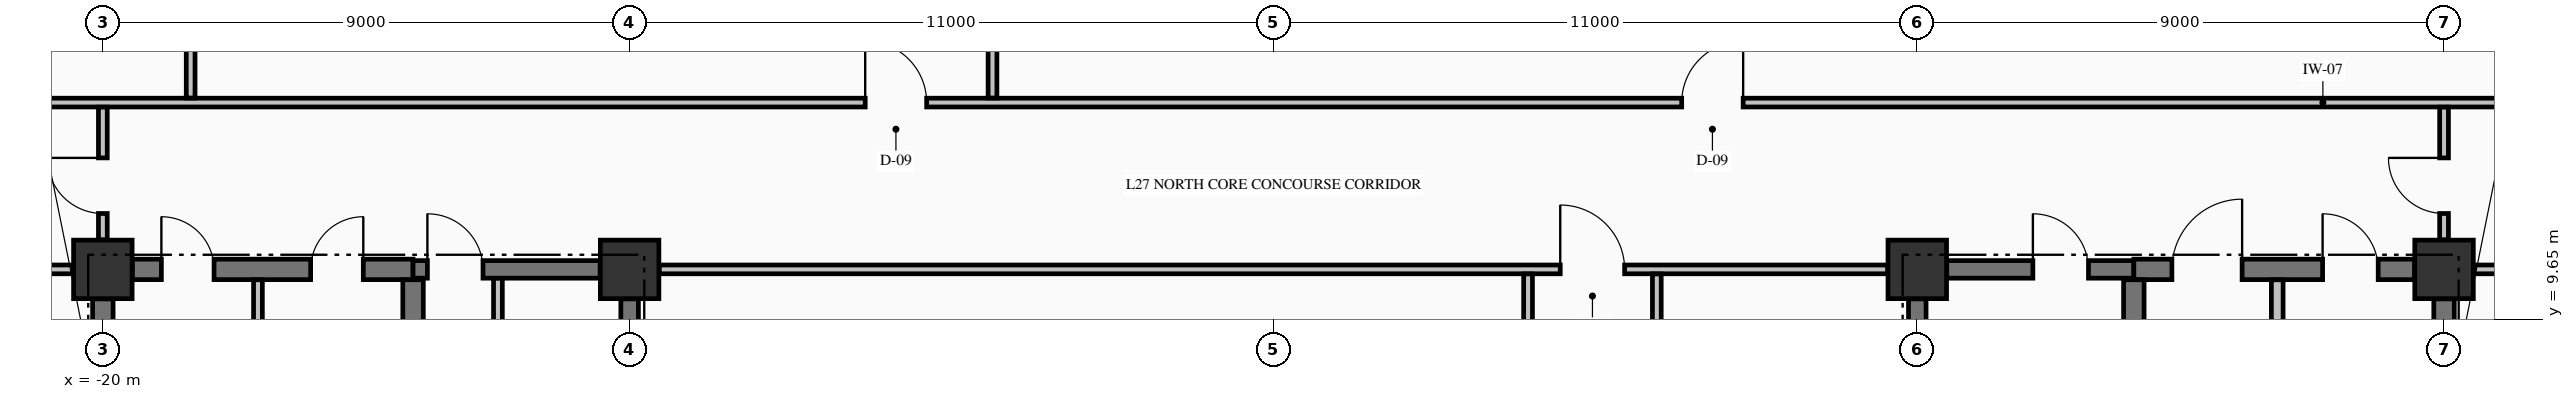
"""IFC4 building model, lengths in metres.
Left out: names, types, materials, properties, quantities, classifications, styles, units other than length and angle.
Written with IfcOpenShell. Run it as: python <this file> out.ifc"""

import sys

from ifc_helpers import new_model, si_unit, direction, frame, frame_2d, origin, origin_2d, place, context, subcontext, project, spatial, rectangle, extrude, element, fill, save


model = new_model("IFC4")
c1 = context("Model", 3, precision=1e-05, world=origin(), true_north=direction((0.0, 1.0)))
c2 = subcontext(c1, "Body", "Model", "MODEL_VIEW")
j1 = project(units=[si_unit("LENGTHUNIT", "METRE"), si_unit("PLANEANGLEUNIT", "RADIAN")], contexts=[c1])
p1 = place(None, origin())
s1 = spatial("IfcSite", under=j1, at=p1, CompositionType="ELEMENT")
p2 = place(p1, origin())
s2 = spatial("IfcBuilding", under=s1, at=p2, CompositionType="ELEMENT")
p3 = place(p2, frame((0.0, 0.0, 109.21)))
s3 = spatial("IfcBuildingStorey", under=s2, at=p3, CompositionType="ELEMENT", Elevation=109.21)
for number, where, z_axis, x_axis in (
    (1, (-20.0, 10.5, -0.25), (0.0, 0.0, 1.0), (1.0, 0.0, 0.0)),
    (2, (-11.0, 10.5, -0.25), (0.0, 0.0, 1.0), (1.0, 0.0, 0.0)),
    (3, (11.0, 10.5, -0.25), (0.0, 0.0, 1.0), (1.0, 0.0, 0.0)),
    (4, (20.0, 10.5, -0.25), (0.0, 0.0, 1.0), (1.0, 0.0, 0.0)),
):
    element("IfcColumn", number, at=place(p3, frame(where, z_axis=z_axis, x_axis=x_axis)), inside=s3, PredefinedType="COLUMN", context=c2, shape_type="SweptSolid", body=[
        extrude(rectangle(XDim=1.0, YDim=1.0, at=origin_2d()), origin(), (0.0, 0.0, 1.0), 3.57),
    ])
p4 = place(p3, frame((-19.496, 10.5, 0.0), z_axis=(0.0, 0.0, 1.0), x_axis=(1.0, 0.0, 0.0)))
e5 = element("IfcWall", 5, at=p4, inside=s3, PredefinedType="SHEAR", context=c2, shape_type="SweptSolid", body=[
    extrude(rectangle(XDim=4.796, YDim=0.35, at=frame_2d((2.398, 0.0))), origin(), (0.0, 0.0, 1.0), 3.32),
])
p5 = place(p4, frame((0.496, 0.0, 0.0)))
e6 = element("IfcOpeningElement", 6, at=p5, cuts=e5, PredefinedType="OPENING", context=c2, shape_type="SweptSolid", body=[
    extrude(rectangle(XDim=0.9, YDim=2.15, at=frame_2d((0.45, 1.075))), frame((0.0, 0.185, 0.0), z_axis=(0.0, -1.0, 0.0), x_axis=(1.0, 0.0, 0.0)), (0.0, 0.0, 1.0), 0.37),
])
p6 = place(p4, frame((3.046, 0.0, 0.0)))
e7 = element("IfcOpeningElement", 7, at=p6, cuts=e5, PredefinedType="OPENING", context=c2, shape_type="SweptSolid", body=[
    extrude(rectangle(XDim=0.9, YDim=2.15, at=frame_2d((0.45, 1.075))), frame((0.0, 0.185, 0.0), z_axis=(0.0, -1.0, 0.0), x_axis=(1.0, 0.0, 0.0)), (0.0, 0.0, 1.0), 0.37),
])
p7 = place(p3, frame((-14.7, 10.5, 0.0), z_axis=(0.0, 0.0, 1.0), x_axis=(1.0, 0.0, 0.0)))
e8 = element("IfcWall", 8, at=p7, inside=s3, PredefinedType="SHEAR", context=c2, shape_type="SweptSolid", body=[
    extrude(rectangle(XDim=3.196, YDim=0.3, at=frame_2d((1.598, 0.0))), origin(), (0.0, 0.0, 1.0), 3.32),
])
p8 = place(p7, frame((0.245, 0.0, 0.0)))
e9 = element("IfcOpeningElement", 9, at=p8, cuts=e8, PredefinedType="OPENING", context=c2, shape_type="SweptSolid", body=[
    extrude(rectangle(XDim=0.95, YDim=2.15, at=frame_2d((0.475, 1.075))), frame((0.0, 0.16, 0.0), z_axis=(0.0, -1.0, 0.0), x_axis=(1.0, 0.0, 0.0)), (0.0, 0.0, 1.0), 0.32),
])
p9 = place(p3, frame((11.504, 10.5, 0.0), z_axis=(0.0, 0.0, 1.0), x_axis=(1.0, 0.0, 0.0)))
e10 = element("IfcWall", 10, at=p9, inside=s3, PredefinedType="SHEAR", context=c2, shape_type="SweptSolid", body=[
    extrude(rectangle(XDim=3.196, YDim=0.3, at=frame_2d((1.598, 0.0))), origin(), (0.0, 0.0, 1.0), 3.32),
])
p10 = place(p9, frame((1.471, 0.0, 0.0)))
e11 = element("IfcOpeningElement", 11, at=p10, cuts=e10, PredefinedType="OPENING", context=c2, shape_type="SweptSolid", body=[
    extrude(rectangle(XDim=0.95, YDim=2.15, at=frame_2d((0.475, 1.075))), frame((0.0, 0.16, 0.0), z_axis=(0.0, -1.0, 0.0), x_axis=(1.0, 0.0, 0.0)), (0.0, 0.0, 1.0), 0.32),
])
p11 = place(p3, frame((14.7, 10.5, 0.0), z_axis=(0.0, 0.0, 1.0), x_axis=(1.0, 0.0, 0.0)))
e12 = element("IfcWall", 12, at=p11, inside=s3, PredefinedType="SHEAR", context=c2, shape_type="SweptSolid", body=[
    extrude(rectangle(XDim=4.796, YDim=0.35, at=frame_2d((2.398, 0.0))), origin(), (0.0, 0.0, 1.0), 3.32),
])
p12 = place(p11, frame((0.65, 0.0, 0.0)))
e13 = element("IfcOpeningElement", 13, at=p12, cuts=e12, PredefinedType="OPENING", context=c2, shape_type="SweptSolid", body=[
    extrude(rectangle(XDim=1.2, YDim=2.15, at=frame_2d((0.6, 1.075))), frame((0.0, 0.185, 0.0), z_axis=(0.0, -1.0, 0.0), x_axis=(1.0, 0.0, 0.0)), (0.0, 0.0, 1.0), 0.37),
])
p13 = place(p11, frame((3.225, 0.0, 0.0)))
e14 = element("IfcOpeningElement", 14, at=p13, cuts=e12, PredefinedType="OPENING", context=c2, shape_type="SweptSolid", body=[
    extrude(rectangle(XDim=0.95, YDim=2.15, at=frame_2d((0.475, 1.075))), frame((0.0, 0.185, 0.0), z_axis=(0.0, -1.0, 0.0), x_axis=(1.0, 0.0, 0.0)), (0.0, 0.0, 1.0), 0.37),
])
p14 = place(p3, frame((-22.835, 10.5, 0.0), z_axis=(0.0, 0.0, 1.0), x_axis=(1.0, 0.0, 0.0)))
e15 = element("IfcWall", 15, at=p14, inside=s3, PredefinedType="PARTITIONING", context=c2, shape_type="SweptSolid", body=[
    extrude(rectangle(XDim=2.329, YDim=0.15, at=frame_2d((1.165, 0.0))), origin(), (0.0, 0.0, 1.0), 3.32),
])
p15 = place(p14, frame((0.835, 0.0, 0.0)))
e16 = element("IfcOpeningElement", 16, at=p15, cuts=e15, PredefinedType="OPENING", context=c2, shape_type="SweptSolid", body=[
    extrude(rectangle(XDim=1.0, YDim=2.15, at=frame_2d((0.5, 1.075))), frame((0.0, 0.085, 0.0), z_axis=(0.0, -1.0, 0.0), x_axis=(1.0, 0.0, 0.0)), (0.0, 0.0, 1.0), 0.17),
])
p16 = place(p3, frame((-10.494, 10.5, 0.0), z_axis=(0.0, 0.0, 1.0), x_axis=(1.0, 0.0, 0.0)))
e17 = element("IfcWall", 17, at=p16, inside=s3, PredefinedType="PARTITIONING", context=c2, shape_type="SweptSolid", body=[
    extrude(rectangle(XDim=20.988, YDim=0.15, at=frame_2d((10.494, 0.0))), origin(), (0.0, 0.0, 1.0), 3.32),
])
p17 = place(p16, frame((15.394, 0.0, 0.0)))
e18 = element("IfcOpeningElement", 18, at=p17, cuts=e17, PredefinedType="OPENING", context=c2, shape_type="SweptSolid", body=[
    extrude(rectangle(XDim=1.1, YDim=2.15, at=frame_2d((0.55, 1.075))), frame((0.0, 0.085, 0.0), z_axis=(0.0, -1.0, 0.0), x_axis=(1.0, 0.0, 0.0)), (0.0, 0.0, 1.0), 0.17),
])
p18 = place(p3, frame((20.506, 10.5, 0.0), z_axis=(0.0, 0.0, 1.0), x_axis=(1.0, 0.0, 0.0)))
e19 = element("IfcWall", 19, at=p18, inside=s3, PredefinedType="PARTITIONING", context=c2, shape_type="SweptSolid", body=[
    extrude(rectangle(XDim=7.329, YDim=0.15, at=frame_2d((3.665, 0.0))), origin(), (0.0, 0.0, 1.0), 3.32),
])
p19 = place(p18, frame((3.019, 0.0, 0.0)))
e20 = element("IfcOpeningElement", 20, at=p19, cuts=e19, PredefinedType="OPENING", context=c2, shape_type="SweptSolid", body=[
    extrude(rectangle(XDim=0.95, YDim=2.15, at=frame_2d((0.475, 1.075))), frame((0.0, 0.085, 0.0), z_axis=(0.0, -1.0, 0.0), x_axis=(1.0, 0.0, 0.0)), (0.0, 0.0, 1.0), 0.17),
])
p20 = place(p3, frame((-22.835, 13.35, 0.0), z_axis=(0.0, 0.0, 1.0), x_axis=(1.0, 0.0, 0.0)))
e21 = element("IfcWall", 21, at=p20, inside=s3, PredefinedType="PARTITIONING", context=c2, shape_type="SweptSolid", body=[
    extrude(rectangle(XDim=50.67, YDim=0.15, at=frame_2d((25.335, 0.0))), origin(), (0.0, 0.0, 1.0), 3.32),
])
p21 = place(p20, frame((15.86, 0.0, 0.0)))
e22 = element("IfcOpeningElement", 22, at=p21, cuts=e21, PredefinedType="OPENING", context=c2, shape_type="SweptSolid", body=[
    extrude(rectangle(XDim=1.05, YDim=2.15, at=frame_2d((0.525, 1.075))), frame((0.0, 0.085, 0.0), z_axis=(0.0, -1.0, 0.0), x_axis=(1.0, 0.0, 0.0)), (0.0, 0.0, 1.0), 0.17),
])
p22 = place(p20, frame((29.81, 0.0, 0.0)))
e23 = element("IfcOpeningElement", 23, at=p22, cuts=e21, PredefinedType="OPENING", context=c2, shape_type="SweptSolid", body=[
    extrude(rectangle(XDim=1.05, YDim=2.15, at=frame_2d((0.525, 1.075))), frame((0.0, 0.085, 0.0), z_axis=(0.0, -1.0, 0.0), x_axis=(1.0, 0.0, 0.0)), (0.0, 0.0, 1.0), 0.17),
])
p23 = place(p3, frame((-20.0, 0.504, 0.0), z_axis=(0.0, 0.0, 1.0), x_axis=(0.0, 1.0, 0.0)))
e24 = element("IfcWall", 24, at=p23, inside=s3, PredefinedType="SHEAR", context=c2, shape_type="SweptSolid", body=[
    extrude(rectangle(XDim=9.492, YDim=0.35, at=frame_2d((4.746, 0.0))), origin(), (0.0, 0.0, 1.0), 3.32),
])
p24 = place(p3, frame((-14.7, 5.852, 0.0), z_axis=(0.0, 0.0, 1.0), x_axis=(0.0, 1.0, 0.0)))
e25 = element("IfcWall", 25, at=p24, inside=s3, PredefinedType="SHEAR", context=c2, shape_type="SweptSolid", body=[
    extrude(rectangle(XDim=4.471, YDim=0.35, at=frame_2d((2.235, 0.0))), origin(), (0.0, 0.0, 1.0), 3.32),
])
for number, where, z_axis, x_axis in (
    (26, (-11.0, 5.852, 0.0), (0.0, 0.0, 1.0), (0.0, 1.0, 0.0)),
    (27, (11.0, 5.852, 0.0), (0.0, 0.0, 1.0), (0.0, 1.0, 0.0)),
):
    element("IfcWall", number, at=place(p3, frame(where, z_axis=z_axis, x_axis=x_axis)), inside=s3, PredefinedType="SHEAR", context=c2, shape_type="SweptSolid", body=[
        extrude(rectangle(XDim=4.144, YDim=0.3, at=frame_2d((2.072, 0.0))), origin(), (0.0, 0.0, 1.0), 3.32),
    ])
p25 = place(p3, frame((14.7, 5.852, 0.0), z_axis=(0.0, 0.0, 1.0), x_axis=(0.0, 1.0, 0.0)))
e28 = element("IfcWall", 28, at=p25, inside=s3, PredefinedType="SHEAR", context=c2, shape_type="SweptSolid", body=[
    extrude(rectangle(XDim=4.471, YDim=0.35, at=frame_2d((2.235, 0.0))), origin(), (0.0, 0.0, 1.0), 3.32),
])
p26 = place(p3, frame((20.0, 5.377, 0.0), z_axis=(0.0, 0.0, 1.0), x_axis=(0.0, 1.0, 0.0)))
e29 = element("IfcWall", 29, at=p26, inside=s3, PredefinedType="SHEAR", context=c2, shape_type="SweptSolid", body=[
    extrude(rectangle(XDim=4.619, YDim=0.35, at=frame_2d((2.31, 0.0))), origin(), (0.0, 0.0, 1.0), 3.32),
])
p27 = place(p3, frame((-20.0, 11.006, 0.0), z_axis=(0.0, 0.0, 1.0), x_axis=(0.0, 1.0, 0.0)))
e30 = element("IfcWall", 30, at=p27, inside=s3, PredefinedType="PARTITIONING", context=c2, shape_type="SweptSolid", body=[
    extrude(rectangle(XDim=2.266, YDim=0.15, at=frame_2d((1.133, 0.0))), origin(), (0.0, 0.0, 1.0), 2.81),
])
p28 = place(p27, frame((0.449, 0.0, 0.0)))
e31 = element("IfcOpeningElement", 31, at=p28, cuts=e30, PredefinedType="OPENING", context=c2, shape_type="SweptSolid", body=[
    extrude(rectangle(XDim=0.95, YDim=2.15, at=frame_2d((0.475, 1.075))), frame((0.0, 0.085, 0.0), z_axis=(0.0, -1.0, 0.0), x_axis=(1.0, 0.0, 0.0)), (0.0, 0.0, 1.0), 0.17),
])
p29 = place(p3, frame((-18.5, 13.428, 0.0), z_axis=(0.0, 0.0, 1.0), x_axis=(0.0, 1.0, 0.0)))
e32 = element("IfcWall", 32, at=p29, inside=s3, PredefinedType="PARTITIONING", context=c2, shape_type="SweptSolid", body=[
    extrude(rectangle(XDim=6.966, YDim=0.15, at=frame_2d((3.483, 0.0))), origin(), (0.0, 0.0, 1.0), 3.32),
])
p30 = place(p3, frame((-17.35, -0.097, 0.0), z_axis=(0.0, 0.0, 1.0), x_axis=(0.0, 1.0, 0.0)))
e33 = element("IfcWall", 33, at=p30, inside=s3, PredefinedType="PARTITIONING", context=c2, shape_type="SweptSolid", body=[
    extrude(rectangle(XDim=10.419, YDim=0.15, at=frame_2d((5.209, 0.0))), origin(), (0.0, 0.0, 1.0), 3.32),
])
p31 = place(p3, frame((-13.25, 5.853, 0.0), z_axis=(0.0, 0.0, 1.0), x_axis=(0.0, 1.0, 0.0)))
e34 = element("IfcWall", 34, at=p31, inside=s3, PredefinedType="PARTITIONING", context=c2, shape_type="SweptSolid", body=[
    extrude(rectangle(XDim=4.494, YDim=0.15, at=frame_2d((2.247, 0.0))), origin(), (0.0, 0.0, 1.0), 3.32),
])
p32 = place(p31, frame((1.472, 0.0, 0.0)))
e35 = element("IfcOpeningElement", 35, at=p32, cuts=e34, PredefinedType="OPENING", context=c2, shape_type="SweptSolid", body=[
    extrude(rectangle(XDim=0.95, YDim=2.15, at=frame_2d((0.475, 1.075))), frame((0.0, 0.085, 0.0), z_axis=(0.0, -1.0, 0.0), x_axis=(1.0, 0.0, 0.0)), (0.0, 0.0, 1.0), 0.17),
])
p33 = place(p3, frame((-4.8, 13.428, 0.0), z_axis=(0.0, 0.0, 1.0), x_axis=(0.0, 1.0, 0.0)))
e36 = element("IfcWall", 36, at=p33, inside=s3, PredefinedType="PARTITIONING", context=c2, shape_type="SweptSolid", body=[
    extrude(rectangle(XDim=11.907, YDim=0.15, at=frame_2d((5.954, 0.0))), origin(), (0.0, 0.0, 1.0), 3.32),
])
for number, where, z_axis, x_axis in (
    (37, (4.35, 2.978, 0.0), (0.0, 0.0, 1.0), (0.0, 1.0, 0.0)),
    (38, (6.55, 2.978, 0.0), (0.0, 0.0, 1.0), (0.0, 1.0, 0.0)),
):
    element("IfcWall", number, at=place(p3, frame(where, z_axis=z_axis, x_axis=x_axis)), inside=s3, PredefinedType="PARTITIONING", context=c2, shape_type="SweptSolid", body=[
        extrude(rectangle(XDim=7.444, YDim=0.15, at=frame_2d((3.722, 0.0))), origin(), (0.0, 0.0, 1.0), 3.32),
    ])
p34 = place(p3, frame((17.15, 7.928, 0.0), z_axis=(0.0, 0.0, 1.0), x_axis=(0.0, 1.0, 0.0)))
e39 = element("IfcWall", 39, at=p34, inside=s3, PredefinedType="PARTITIONING", context=c2, shape_type="SweptSolid", body=[
    extrude(rectangle(XDim=2.394, YDim=0.2, at=frame_2d((1.197, 0.0))), origin(), (0.0, 0.0, 1.0), 3.32),
])
p35 = place(p3, frame((20.0, 11.006, 0.0), z_axis=(0.0, 0.0, 1.0), x_axis=(0.0, 1.0, 0.0)))
e40 = element("IfcWall", 40, at=p35, inside=s3, PredefinedType="PARTITIONING", context=c2, shape_type="SweptSolid", body=[
    extrude(rectangle(XDim=2.266, YDim=0.15, at=frame_2d((1.133, 0.0))), origin(), (0.0, 0.0, 1.0), 2.81),
])
p36 = place(p35, frame((0.449, 0.0, 0.0)))
e41 = element("IfcOpeningElement", 41, at=p36, cuts=e40, PredefinedType="OPENING", context=c2, shape_type="SweptSolid", body=[
    extrude(rectangle(XDim=0.95, YDim=2.15, at=frame_2d((0.475, 1.075))), frame((0.0, 0.085, 0.0), z_axis=(0.0, -1.0, 0.0), x_axis=(1.0, 0.0, 0.0)), (0.0, 0.0, 1.0), 0.17),
])
p37 = place(p8, origin())
e42 = element("IfcDoor", 42, at=p37, inside=s3, OperationType="SINGLE_SWING_LEFT", PredefinedType="DOOR", context=c2, shape_type="SweptSolid", body=[
    extrude(rectangle(XDim=0.95, YDim=2.15, at=frame_2d((0.475, 1.075))), frame((0.0, 0.025, 0.0), z_axis=(0.0, -1.0, 0.0), x_axis=(1.0, 0.0, 0.0)), (0.0, 0.0, 1.0), 0.05),
])
fill(e9, e42)
p38 = place(p10, origin())
e43 = element("IfcDoor", 43, at=p38, inside=s3, OperationType="SINGLE_SWING_LEFT", PredefinedType="DOOR", context=c2, shape_type="SweptSolid", body=[
    extrude(rectangle(XDim=0.95, YDim=2.15, at=frame_2d((0.475, 1.075))), frame((0.0, 0.025, 0.0), z_axis=(0.0, -1.0, 0.0), x_axis=(1.0, 0.0, 0.0)), (0.0, 0.0, 1.0), 0.05),
])
fill(e11, e43)
p39 = place(p5, origin())
e44 = element("IfcDoor", 44, at=p39, inside=s3, OperationType="SINGLE_SWING_LEFT", PredefinedType="DOOR", context=c2, shape_type="SweptSolid", body=[
    extrude(rectangle(XDim=0.9, YDim=2.15, at=frame_2d((0.45, 1.075))), frame((0.0, 0.025, 0.0), z_axis=(0.0, -1.0, 0.0), x_axis=(1.0, 0.0, 0.0)), (0.0, 0.0, 1.0), 0.05),
])
fill(e6, e44)
p40 = place(p6, origin())
e45 = element("IfcDoor", 45, at=p40, inside=s3, OperationType="SINGLE_SWING_RIGHT", PredefinedType="DOOR", context=c2, shape_type="SweptSolid", body=[
    extrude(rectangle(XDim=0.9, YDim=2.15, at=frame_2d((0.45, 1.075))), frame((0.0, 0.025, 0.0), z_axis=(0.0, -1.0, 0.0), x_axis=(1.0, 0.0, 0.0)), (0.0, 0.0, 1.0), 0.05),
])
fill(e7, e45)
p41 = place(p12, origin())
e46 = element("IfcDoor", 46, at=p41, inside=s3, OperationType="SINGLE_SWING_RIGHT", PredefinedType="DOOR", context=c2, shape_type="SweptSolid", body=[
    extrude(rectangle(XDim=1.2, YDim=2.15, at=frame_2d((0.6, 1.075))), frame((0.0, 0.025, 0.0), z_axis=(0.0, -1.0, 0.0), x_axis=(1.0, 0.0, 0.0)), (0.0, 0.0, 1.0), 0.05),
])
fill(e13, e46)
p42 = place(p13, origin())
e47 = element("IfcDoor", 47, at=p42, inside=s3, OperationType="SINGLE_SWING_LEFT", PredefinedType="DOOR", context=c2, shape_type="SweptSolid", body=[
    extrude(rectangle(XDim=0.95, YDim=2.15, at=frame_2d((0.475, 1.075))), frame((0.0, 0.025, 0.0), z_axis=(0.0, -1.0, 0.0), x_axis=(1.0, 0.0, 0.0)), (0.0, 0.0, 1.0), 0.05),
])
fill(e14, e47)
p43 = place(p17, origin())
e48 = element("IfcDoor", 48, at=p43, inside=s3, OperationType="SINGLE_SWING_LEFT", PredefinedType="DOOR", context=c2, shape_type="SweptSolid", body=[
    extrude(rectangle(XDim=1.1, YDim=2.15, at=frame_2d((0.55, 1.075))), frame((0.0, 0.025, 0.0), z_axis=(0.0, -1.0, 0.0), x_axis=(1.0, 0.0, 0.0)), (0.0, 0.0, 1.0), 0.05),
])
fill(e18, e48)
p44 = place(p21, origin())
e49 = element("IfcDoor", 49, at=p44, inside=s3, OperationType="SINGLE_SWING_LEFT", PredefinedType="DOOR", context=c2, shape_type="SweptSolid", body=[
    extrude(rectangle(XDim=1.05, YDim=2.15, at=frame_2d((0.525, 1.075))), frame((0.0, 0.025, 0.0), z_axis=(0.0, -1.0, 0.0), x_axis=(1.0, 0.0, 0.0)), (0.0, 0.0, 1.0), 0.05),
])
fill(e22, e49)
p45 = place(p22, origin())
e50 = element("IfcDoor", 50, at=p45, inside=s3, OperationType="SINGLE_SWING_RIGHT", PredefinedType="DOOR", context=c2, shape_type="SweptSolid", body=[
    extrude(rectangle(XDim=1.05, YDim=2.15, at=frame_2d((0.525, 1.075))), frame((0.0, 0.025, 0.0), z_axis=(0.0, -1.0, 0.0), x_axis=(1.0, 0.0, 0.0)), (0.0, 0.0, 1.0), 0.05),
])
fill(e23, e50)
p46 = place(p28, origin())
e51 = element("IfcDoor", 51, at=p46, inside=s3, OperationType="SINGLE_SWING_RIGHT", PredefinedType="DOOR", context=c2, shape_type="SweptSolid", body=[
    extrude(rectangle(XDim=0.95, YDim=2.15, at=frame_2d((0.475, 1.075))), frame((0.0, 0.025, 0.0), z_axis=(0.0, -1.0, 0.0), x_axis=(1.0, 0.0, 0.0)), (0.0, 0.0, 1.0), 0.05),
])
fill(e31, e51)
p47 = place(p36, origin())
e52 = element("IfcDoor", 52, at=p47, inside=s3, OperationType="SINGLE_SWING_RIGHT", PredefinedType="DOOR", context=c2, shape_type="SweptSolid", body=[
    extrude(rectangle(XDim=0.95, YDim=2.15, at=frame_2d((0.475, 1.075))), frame((0.0, 0.025, 0.0), z_axis=(0.0, -1.0, 0.0), x_axis=(1.0, 0.0, 0.0)), (0.0, 0.0, 1.0), 0.05),
])
fill(e41, e52)
save(model, sys.argv[1])
